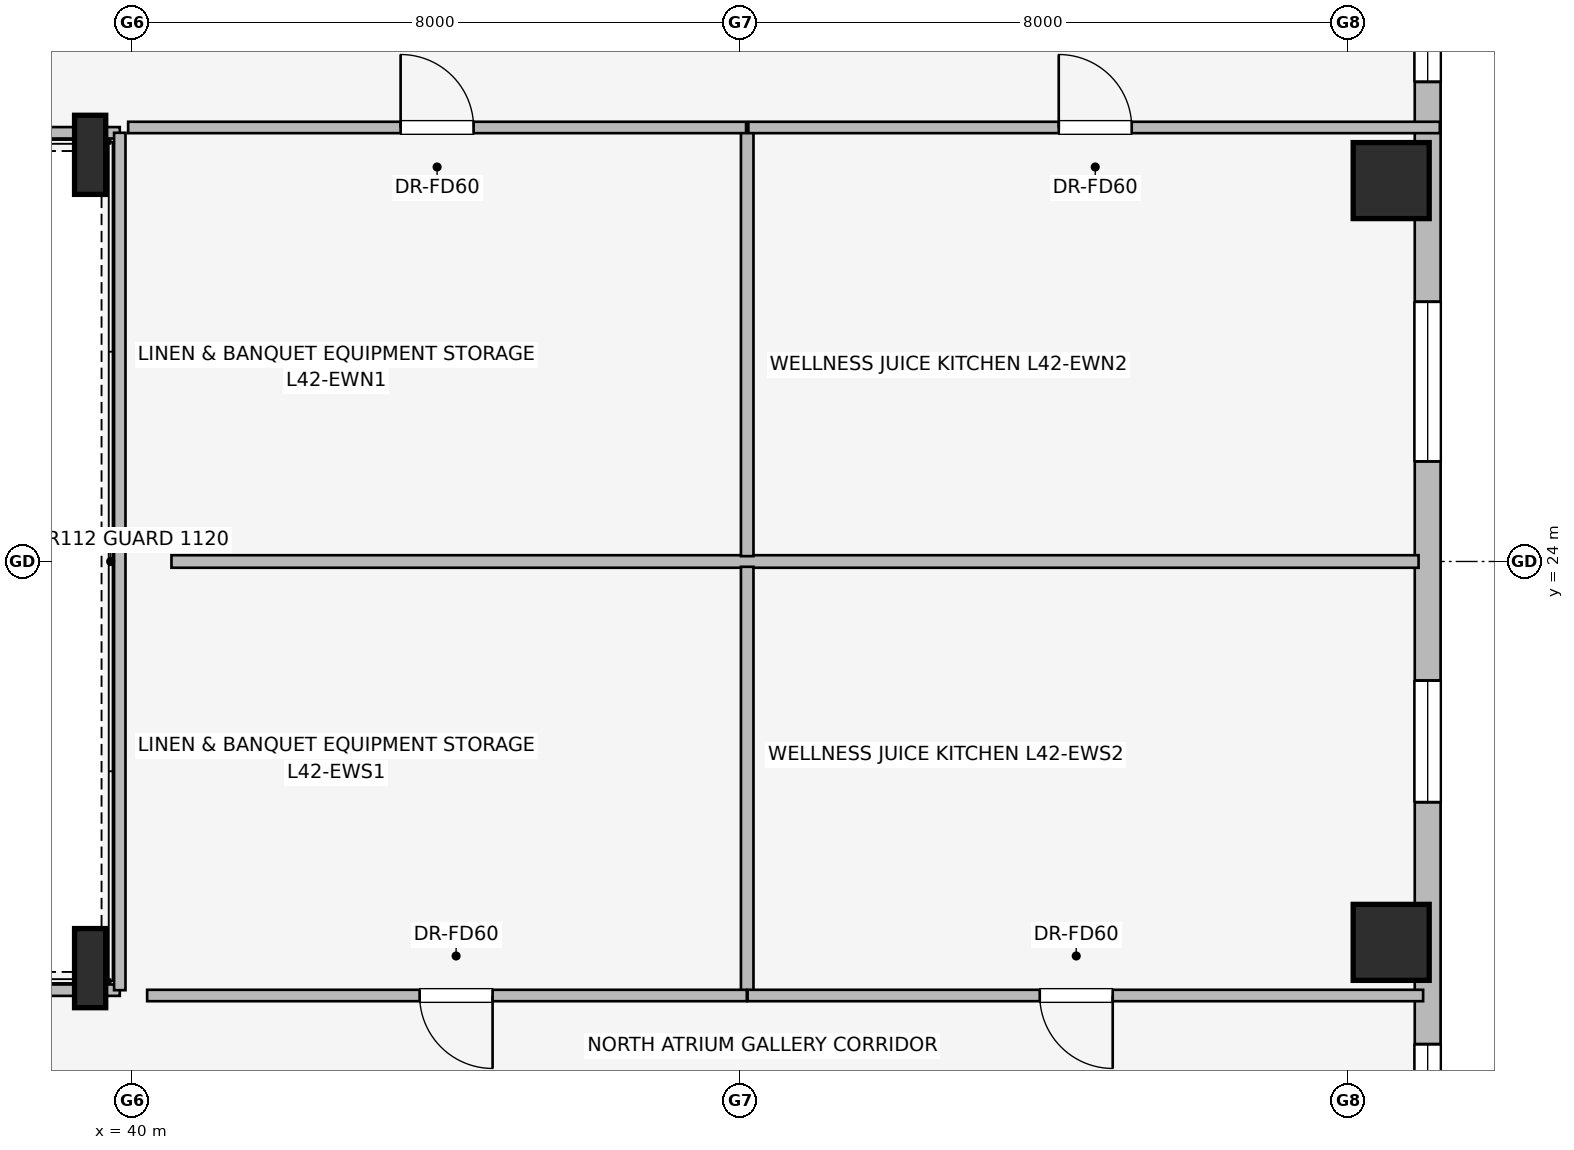
"""IFC4 building model, lengths in metres.
Left out: names, types, materials, properties, quantities, classifications, styles, units other than length and angle.
Written with IfcOpenShell. Run it as: python <this file> out.ifc"""

import sys

from ifc_helpers import new_model, si_unit, direction, frame, frame_2d, origin, origin_2d, place, context, subcontext, project, spatial, rectangle, i_section, extrude, element, fill, save


model = new_model("IFC4")
c1 = context("Model", 3, precision=1e-05, world=origin(), true_north=direction((0.0, 1.0)))
c2 = subcontext(c1, "Body", "Model", "MODEL_VIEW")
j1 = project(units=[si_unit("LENGTHUNIT", "METRE"), si_unit("PLANEANGLEUNIT", "RADIAN")], contexts=[c1])
p1 = place(None, origin())
s1 = spatial("IfcSite", under=j1, at=p1, CompositionType="ELEMENT")
p2 = place(p1, origin())
s2 = spatial("IfcBuilding", under=s1, at=p2, CompositionType="ELEMENT")
p3 = place(p2, frame((0.0, 0.0, 156.75)))
s3 = spatial("IfcBuildingStorey", under=s2, at=p3, CompositionType="ELEMENT", Elevation=156.75)
for number, where, z_axis, x_axis in (
    (1, (56.568, 18.989, 0.0), (0.0, 0.0, 1.0), (1.0, 0.0, 0.0)),
    (2, (56.568, 29.011, 0.0), (0.0, 0.0, 1.0), (1.0, 0.0, 0.0)),
):
    element("IfcColumn", number, at=place(p3, frame(where, z_axis=z_axis, x_axis=x_axis)), inside=s3, PredefinedType="COLUMN", context=c2, shape_type="SweptSolid", body=[
        extrude(rectangle(XDim=1.0, YDim=1.0, at=origin_2d()), origin(), (0.0, 0.0, 1.0), 3.45),
    ])
for number, where, z_axis, x_axis in (
    (3, (39.45, 18.65, 0.0), (0.0, 0.0, 1.0), (1.0, 0.0, 0.0)),
    (4, (39.45, 29.35, 0.0), (0.0, 0.0, 1.0), (1.0, 0.0, 0.0)),
):
    element("IfcColumn", number, at=place(p3, frame(where, z_axis=z_axis, x_axis=x_axis)), inside=s3, PredefinedType="COLUMN", context=c2, shape_type="SweptSolid", body=[
        extrude(i_section(OverallWidth=0.41, OverallDepth=1.041, WebThickness=0.031, FlangeThickness=0.056, at=origin_2d()), origin(), (0.0, 0.0, 1.0), 3.45),
    ])
p4 = place(p3, frame((57.048, 32.352, 0.0), z_axis=(0.0, 0.0, 1.0), x_axis=(0.0, -1.0, 0.0)))
e5 = element("IfcWall", 5, at=p4, inside=s3, PredefinedType="STANDARD", context=c2, shape_type="SweptSolid", body=[
    extrude(rectangle(XDim=16.704, YDim=0.34, at=frame_2d((8.352, 0.0))), origin(), (0.0, 0.0, 1.0), 3.19),
])
p5 = place(p4, frame((0.992, 0.0, 0.75)))
e6 = element("IfcOpeningElement", 6, at=p5, cuts=e5, PredefinedType="OPENING", context=c2, shape_type="SweptSolid", body=[
    extrude(rectangle(XDim=1.05, YDim=1.4, at=frame_2d((0.525, 0.7))), frame((0.0, 0.18, 0.0), z_axis=(0.0, -1.0, 0.0), x_axis=(1.0, 0.0, 0.0)), (0.0, 0.0, 1.0), 0.36),
])
p6 = place(p4, frame((4.935, 0.0, 0.75)))
e7 = element("IfcOpeningElement", 7, at=p6, cuts=e5, PredefinedType="OPENING", context=c2, shape_type="SweptSolid", body=[
    extrude(rectangle(XDim=2.1, YDim=1.5, at=frame_2d((1.05, 0.75))), frame((0.0, 0.18, 0.0), z_axis=(0.0, -1.0, 0.0), x_axis=(1.0, 0.0, 0.0)), (0.0, 0.0, 1.0), 0.36),
])
p7 = place(p4, frame((9.919, 0.0, 0.75)))
e8 = element("IfcOpeningElement", 8, at=p7, cuts=e5, PredefinedType="OPENING", context=c2, shape_type="SweptSolid", body=[
    extrude(rectangle(XDim=1.6, YDim=1.55, at=frame_2d((0.8, 0.775))), frame((0.0, 0.18, 0.0), z_axis=(0.0, -1.0, 0.0), x_axis=(1.0, 0.0, 0.0)), (0.0, 0.0, 1.0), 0.36),
])
p8 = place(p4, frame((14.702, 0.0, 0.75)))
e9 = element("IfcOpeningElement", 9, at=p8, cuts=e5, PredefinedType="OPENING", context=c2, shape_type="SweptSolid", body=[
    extrude(rectangle(XDim=1.05, YDim=1.4, at=frame_2d((0.525, 0.7))), frame((0.0, 0.18, 0.0), z_axis=(0.0, -1.0, 0.0), x_axis=(1.0, 0.0, 0.0)), (0.0, 0.0, 1.0), 0.36),
])
p9 = place(p3, frame((27.55, 18.36, 0.0), z_axis=(0.0, 0.0, 1.0), x_axis=(1.0, 0.0, 0.0)))
e10 = element("IfcWall", 10, at=p9, inside=s3, PredefinedType="PARTITIONING", context=c2, shape_type="SweptSolid", body=[
    extrude(rectangle(XDim=12.29, YDim=0.15, at=frame_2d((6.145, 0.0))), origin(), (0.0, 0.0, 1.0), 2.331),
])
p10 = place(p3, frame((39.84, 29.64, 0.0), z_axis=(0.0, 0.0, 1.0), x_axis=(-1.0, 0.0, 0.0)))
e11 = element("IfcWall", 11, at=p10, inside=s3, PredefinedType="PARTITIONING", context=c2, shape_type="SweptSolid", body=[
    extrude(rectangle(XDim=12.2, YDim=0.15, at=frame_2d((6.1, 0.0))), origin(), (0.0, 0.0, 1.0), 2.331),
])
p11 = place(p3, frame((39.84, 18.36, 0.0), z_axis=(0.0, 0.0, 1.0), x_axis=(0.0, 1.0, 0.0)))
e12 = element("IfcWall", 12, at=p11, inside=s3, PredefinedType="PARTITIONING", context=c2, shape_type="SweptSolid", body=[
    extrude(rectangle(XDim=11.28, YDim=0.15, at=frame_2d((5.64, 0.0))), origin(), (0.0, 0.0, 1.0), 3.19),
])
p12 = place(p3, frame((40.52, 24.0, 0.0), z_axis=(0.0, 0.0, 1.0), x_axis=(1.0, 0.0, 0.0)))
e13 = element("IfcWall", 13, at=p12, inside=s3, PredefinedType="PARTITIONING", context=c2, shape_type="SweptSolid", body=[
    extrude(rectangle(XDim=16.408, YDim=0.165, at=frame_2d((8.204, 0.0))), origin(), (0.0, 0.0, 1.0), 3.19),
])
p13 = place(p3, frame((48.095, 24.07, 0.0), z_axis=(0.0, 0.0, 1.0), x_axis=(0.0, 1.0, 0.0)))
e14 = element("IfcWall", 14, at=p13, inside=s3, PredefinedType="PARTITIONING", context=c2, shape_type="SweptSolid", body=[
    extrude(rectangle(XDim=5.64, YDim=0.165, at=frame_2d((2.82, 0.0))), origin(), (0.0, 0.0, 1.0), 3.19),
])
p14 = place(p3, frame((39.95, 29.71, 0.0), z_axis=(0.0, 0.0, 1.0), x_axis=(1.0, 0.0, 0.0)))
e15 = element("IfcWall", 15, at=p14, inside=s3, PredefinedType="PARTITIONING", context=c2, shape_type="SweptSolid", body=[
    extrude(rectangle(XDim=8.13, YDim=0.15, at=frame_2d((4.065, 0.0))), origin(), (0.0, 0.0, 1.0), 3.19),
])
p15 = place(p14, frame((3.585, 0.0, 0.0)))
e16 = element("IfcOpeningElement", 16, at=p15, cuts=e15, PredefinedType="OPENING", context=c2, shape_type="SweptSolid", body=[
    extrude(rectangle(XDim=0.96, YDim=2.0, at=frame_2d((0.48, 1.0))), frame((0.0, 0.085, 0.0), z_axis=(0.0, -1.0, 0.0), x_axis=(1.0, 0.0, 0.0)), (0.0, 0.0, 1.0), 0.17),
])
p16 = place(p3, frame((48.11, 29.71, 0.0), z_axis=(0.0, 0.0, 1.0), x_axis=(1.0, 0.0, 0.0)))
e17 = element("IfcWall", 17, at=p16, inside=s3, PredefinedType="PARTITIONING", context=c2, shape_type="SweptSolid", body=[
    extrude(rectangle(XDim=9.098, YDim=0.15, at=frame_2d((4.549, 0.0))), origin(), (0.0, 0.0, 1.0), 3.19),
])
p17 = place(p16, frame((4.084, 0.0, 0.0)))
e18 = element("IfcOpeningElement", 18, at=p17, cuts=e17, PredefinedType="OPENING", context=c2, shape_type="SweptSolid", body=[
    extrude(rectangle(XDim=0.96, YDim=2.0, at=frame_2d((0.48, 1.0))), frame((0.0, 0.085, 0.0), z_axis=(0.0, -1.0, 0.0), x_axis=(1.0, 0.0, 0.0)), (0.0, 0.0, 1.0), 0.17),
])
p18 = place(p3, frame((48.095, 18.29, 0.0), z_axis=(0.0, 0.0, 1.0), x_axis=(0.0, 1.0, 0.0)))
e19 = element("IfcWall", 19, at=p18, inside=s3, PredefinedType="PARTITIONING", context=c2, shape_type="SweptSolid", body=[
    extrude(rectangle(XDim=5.64, YDim=0.165, at=frame_2d((2.82, 0.0))), origin(), (0.0, 0.0, 1.0), 3.19),
])
p19 = place(p3, frame((48.09, 18.29, 0.0), z_axis=(0.0, 0.0, 1.0), x_axis=(-1.0, 0.0, 0.0)))
e20 = element("IfcWall", 20, at=p19, inside=s3, PredefinedType="PARTITIONING", context=c2, shape_type="SweptSolid", body=[
    extrude(rectangle(XDim=7.89, YDim=0.15, at=frame_2d((3.945, 0.0))), origin(), (0.0, 0.0, 1.0), 3.19),
])
p20 = place(p19, frame((3.345, 0.0, 0.0)))
e21 = element("IfcOpeningElement", 21, at=p20, cuts=e20, PredefinedType="OPENING", context=c2, shape_type="SweptSolid", body=[
    extrude(rectangle(XDim=0.96, YDim=2.0, at=frame_2d((0.48, 1.0))), frame((0.0, 0.085, 0.0), z_axis=(0.0, -1.0, 0.0), x_axis=(1.0, 0.0, 0.0)), (0.0, 0.0, 1.0), 0.17),
])
p21 = place(p3, frame((56.988, 18.29, 0.0), z_axis=(0.0, 0.0, 1.0), x_axis=(-1.0, 0.0, 0.0)))
e22 = element("IfcWall", 22, at=p21, inside=s3, PredefinedType="PARTITIONING", context=c2, shape_type="SweptSolid", body=[
    extrude(rectangle(XDim=8.888, YDim=0.15, at=frame_2d((4.444, 0.0))), origin(), (0.0, 0.0, 1.0), 3.19),
])
p22 = place(p21, frame((4.084, 0.0, 0.0)))
e23 = element("IfcOpeningElement", 23, at=p22, cuts=e22, PredefinedType="OPENING", context=c2, shape_type="SweptSolid", body=[
    extrude(rectangle(XDim=0.96, YDim=2.0, at=frame_2d((0.48, 1.0))), frame((0.0, 0.085, 0.0), z_axis=(0.0, -1.0, 0.0), x_axis=(1.0, 0.0, 0.0)), (0.0, 0.0, 1.0), 0.17),
])
p23 = place(p5, origin())
e24 = element("IfcWindow", 24, at=p23, inside=s3, PartitioningType="SINGLE_PANEL", PredefinedType="WINDOW", context=c2, shape_type="SweptSolid", body=[
    extrude(rectangle(XDim=1.05, YDim=1.4, at=frame_2d((0.525, 0.7))), frame((0.0, 0.03, 0.0), z_axis=(0.0, -1.0, 0.0), x_axis=(1.0, 0.0, 0.0)), (0.0, 0.0, 1.0), 0.06),
])
fill(e6, e24)
p24 = place(p6, origin())
e25 = element("IfcWindow", 25, at=p24, inside=s3, PartitioningType="SINGLE_PANEL", PredefinedType="WINDOW", context=c2, shape_type="SweptSolid", body=[
    extrude(rectangle(XDim=2.1, YDim=1.5, at=frame_2d((1.05, 0.75))), frame((0.0, 0.03, 0.0), z_axis=(0.0, -1.0, 0.0), x_axis=(1.0, 0.0, 0.0)), (0.0, 0.0, 1.0), 0.06),
])
fill(e7, e25)
p25 = place(p7, origin())
e26 = element("IfcWindow", 26, at=p25, inside=s3, PartitioningType="SINGLE_PANEL", PredefinedType="WINDOW", context=c2, shape_type="SweptSolid", body=[
    extrude(rectangle(XDim=1.6, YDim=1.55, at=frame_2d((0.8, 0.775))), frame((0.0, 0.03, 0.0), z_axis=(0.0, -1.0, 0.0), x_axis=(1.0, 0.0, 0.0)), (0.0, 0.0, 1.0), 0.06),
])
fill(e8, e26)
p26 = place(p8, origin())
e27 = element("IfcWindow", 27, at=p26, inside=s3, PartitioningType="SINGLE_PANEL", PredefinedType="WINDOW", context=c2, shape_type="SweptSolid", body=[
    extrude(rectangle(XDim=1.05, YDim=1.4, at=frame_2d((0.525, 0.7))), frame((0.0, 0.03, 0.0), z_axis=(0.0, -1.0, 0.0), x_axis=(1.0, 0.0, 0.0)), (0.0, 0.0, 1.0), 0.06),
])
fill(e9, e27)
p27 = place(p15, origin())
e28 = element("IfcDoor", 28, at=p27, inside=s3, OperationType="SINGLE_SWING_LEFT", PredefinedType="DOOR", context=c2, shape_type="SweptSolid", body=[
    extrude(rectangle(XDim=0.96, YDim=2.0, at=frame_2d((0.48, 1.0))), frame((0.0, 0.025, 0.0), z_axis=(0.0, -1.0, 0.0), x_axis=(1.0, 0.0, 0.0)), (0.0, 0.0, 1.0), 0.05),
])
fill(e16, e28)
p28 = place(p17, origin())
e29 = element("IfcDoor", 29, at=p28, inside=s3, OperationType="SINGLE_SWING_LEFT", PredefinedType="DOOR", context=c2, shape_type="SweptSolid", body=[
    extrude(rectangle(XDim=0.96, YDim=2.0, at=frame_2d((0.48, 1.0))), frame((0.0, 0.025, 0.0), z_axis=(0.0, -1.0, 0.0), x_axis=(1.0, 0.0, 0.0)), (0.0, 0.0, 1.0), 0.05),
])
fill(e18, e29)
p29 = place(p20, origin())
e30 = element("IfcDoor", 30, at=p29, inside=s3, OperationType="SINGLE_SWING_LEFT", PredefinedType="DOOR", context=c2, shape_type="SweptSolid", body=[
    extrude(rectangle(XDim=0.96, YDim=2.0, at=frame_2d((0.48, 1.0))), frame((0.0, 0.025, 0.0), z_axis=(0.0, -1.0, 0.0), x_axis=(1.0, 0.0, 0.0)), (0.0, 0.0, 1.0), 0.05),
])
fill(e21, e30)
p30 = place(p22, origin())
e31 = element("IfcDoor", 31, at=p30, inside=s3, OperationType="SINGLE_SWING_LEFT", PredefinedType="DOOR", context=c2, shape_type="SweptSolid", body=[
    extrude(rectangle(XDim=0.96, YDim=2.0, at=frame_2d((0.48, 1.0))), frame((0.0, 0.025, 0.0), z_axis=(0.0, -1.0, 0.0), x_axis=(1.0, 0.0, 0.0)), (0.0, 0.0, 1.0), 0.05),
])
fill(e23, e31)
save(model, sys.argv[1])
